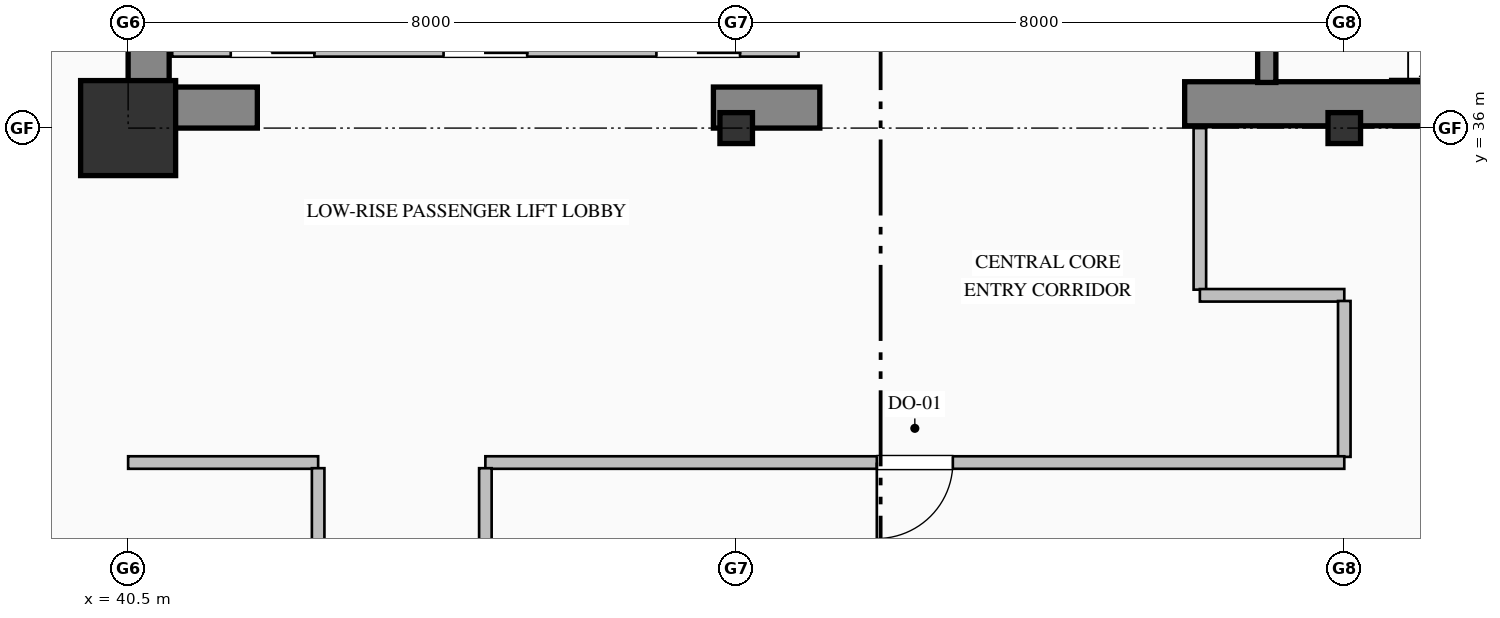
"""IFC4 building model, lengths in metres.
Left out: names, types, materials, properties, quantities, classifications, styles, units other than length and angle.
Written with IfcOpenShell. Run it as: python <this file> out.ifc"""

import sys

from ifc_helpers import new_model, si_unit, direction, frame, frame_2d, origin, origin_2d, place, context, subcontext, project, spatial, rectangle, hollow_rectangle, i_section, extrude, element, fill, save


model = new_model("IFC4")
c1 = context("Model", 3, precision=1e-05, world=origin(), true_north=direction((0.0, 1.0)))
c2 = subcontext(c1, "Body", "Model", "MODEL_VIEW")
j1 = project(units=[si_unit("LENGTHUNIT", "METRE"), si_unit("PLANEANGLEUNIT", "RADIAN")], contexts=[c1])
p1 = place(None, origin())
s1 = spatial("IfcSite", under=j1, at=p1, CompositionType="ELEMENT")
p2 = place(p1, origin())
s2 = spatial("IfcBuilding", under=s1, at=p2, CompositionType="ELEMENT")
p3 = place(p2, frame((0.0, 0.0, 92.2)))
s3 = spatial("IfcBuildingStorey", under=s2, at=p3, CompositionType="ELEMENT", Elevation=92.2)
p4 = place(p3, frame((40.77, 36.54, 0.0), z_axis=(0.0, 0.0, 1.0), x_axis=(0.0, 1.0, 0.0)))
e1 = element("IfcWall", 1, at=p4, inside=s3, PredefinedType="SHEAR", context=c2, shape_type="SweptSolid", body=[
    extrude(rectangle(XDim=7.86, YDim=0.54, at=frame_2d((3.93, 0.0))), origin(), (0.0, 0.0, 1.0), 3.75),
])
p5 = place(p3, frame((40.5, 36.27, 0.0), z_axis=(0.0, 0.0, 1.0), x_axis=(1.0, 0.0, 0.0)))
e2 = element("IfcWall", 2, at=p5, inside=s3, PredefinedType="SHEAR", context=c2, shape_type="SweptSolid", body=[
    extrude(rectangle(XDim=1.7, YDim=0.54, at=frame_2d((0.85, 0.0))), origin(), (0.0, 0.0, 1.0), 3.75),
])
p6 = place(p3, frame((48.2, 36.27, 0.0), z_axis=(0.0, 0.0, 1.0), x_axis=(1.0, 0.0, 0.0)))
e3 = element("IfcWall", 3, at=p6, inside=s3, PredefinedType="SHEAR", context=c2, shape_type="SweptSolid", body=[
    extrude(rectangle(XDim=1.4, YDim=0.54, at=frame_2d((0.7, 0.0))), origin(), (0.0, 0.0, 1.0), 3.75),
])
p7 = place(p3, frame((54.4, 36.32, 0.0), z_axis=(0.0, 0.0, 1.0), x_axis=(1.0, 0.0, 0.0)))
e4 = element("IfcWall", 4, at=p7, inside=s3, PredefinedType="SHEAR", context=c2, shape_type="SweptSolid", body=[
    extrude(rectangle(XDim=9.6, YDim=0.58, at=frame_2d((4.8, 0.0))), origin(), (0.0, 0.0, 1.0), 4.0),
])
p8 = place(p3, frame((40.5, 36.0, 0.0), z_axis=(0.0, 0.0, 1.0), x_axis=(1.0, 0.0, 0.0)))
e5 = element("IfcColumn", 5, at=p8, inside=s3, PredefinedType="COLUMN", context=c2, shape_type="SweptSolid", body=[
    extrude(hollow_rectangle(XDim=1.25, YDim=1.25, WallThickness=0.045, at=origin_2d()), origin(), (0.0, 0.0, 1.0), 4.0),
])
for number, where, z_axis, x_axis in (
    (6, (48.5, 36.0, 0.0), (0.0, 0.0, 1.0), (1.0, 0.0, 0.0)),
    (7, (56.5, 36.0, 0.0), (0.0, 0.0, 1.0), (1.0, 0.0, 0.0)),
):
    element("IfcColumn", number, at=place(p3, frame(where, z_axis=z_axis, x_axis=x_axis)), inside=s3, PredefinedType="COLUMN", context=c2, shape_type="SweptSolid", body=[
        extrude(i_section(OverallWidth=0.407, OverallDepth=0.428, WebThickness=0.02, FlangeThickness=0.035, FilletRadius=0.022, at=origin_2d()), origin(), (0.0, 0.0, 1.0), 4.0),
    ])
p9 = place(p3, frame((55.48, 39.75, 0.0), z_axis=(0.0, 0.0, 1.0), x_axis=(0.0, -1.0, 0.0)))
e8 = element("IfcWall", 8, at=p9, inside=s3, PredefinedType="SOLIDWALL", context=c2, shape_type="SweptSolid", body=[
    extrude(rectangle(XDim=3.15, YDim=0.24, at=frame_2d((1.575, 0.0))), origin(), (0.0, 0.0, 1.0), 4.0),
])
p10 = place(p9, frame((1.0, 0.0, 0.0)))
e9 = element("IfcOpeningElement", 9, at=p10, cuts=e8, PredefinedType="OPENING", context=c2, shape_type="SweptSolid", body=[
    extrude(rectangle(XDim=1.15, YDim=2.2, at=frame_2d((0.575, 1.1))), frame((0.0, 0.13, 0.0), z_axis=(0.0, -1.0, 0.0), x_axis=(1.0, 0.0, 0.0)), (0.0, 0.0, 1.0), 0.26),
])
p11 = place(p3, frame((49.32, 37.05, 0.0), z_axis=(0.0, 0.0, 1.0), x_axis=(-1.0, 0.0, 0.0)))
e10 = element("IfcWall", 10, at=p11, inside=s3, PredefinedType="PARTITIONING", context=c2, shape_type="SweptSolid", body=[
    extrude(rectangle(XDim=8.24, YDim=0.22, at=frame_2d((4.12, 0.0))), origin(), (0.0, 0.0, 1.0), 3.75),
])
p12 = place(p11, frame((6.37, 0.0, 0.0)))
e11 = element("IfcOpeningElement", 11, at=p12, cuts=e10, PredefinedType="OPENING", context=c2, shape_type="SweptSolid", body=[
    extrude(rectangle(XDim=1.1, YDim=2.2, at=frame_2d((0.55, 1.1))), frame((0.0, 0.12, 0.0), z_axis=(0.0, -1.0, 0.0), x_axis=(1.0, 0.0, 0.0)), (0.0, 0.0, 1.0), 0.24),
])
p13 = place(p11, frame((3.57, 0.0, 0.0)))
e12 = element("IfcOpeningElement", 12, at=p13, cuts=e10, PredefinedType="OPENING", context=c2, shape_type="SweptSolid", body=[
    extrude(rectangle(XDim=1.1, YDim=2.2, at=frame_2d((0.55, 1.1))), frame((0.0, 0.12, 0.0), z_axis=(0.0, -1.0, 0.0), x_axis=(1.0, 0.0, 0.0)), (0.0, 0.0, 1.0), 0.24),
])
p14 = place(p11, frame((0.77, 0.0, 0.0)))
e13 = element("IfcOpeningElement", 13, at=p14, cuts=e10, PredefinedType="OPENING", context=c2, shape_type="SweptSolid", body=[
    extrude(rectangle(XDim=1.1, YDim=2.2, at=frame_2d((0.55, 1.1))), frame((0.0, 0.12, 0.0), z_axis=(0.0, -1.0, 0.0), x_axis=(1.0, 0.0, 0.0)), (0.0, 0.0, 1.0), 0.24),
])
p15 = place(p3, frame((54.6, 36.0, 0.0), z_axis=(0.0, 0.0, 1.0), x_axis=(0.0, -1.0, 0.0)))
e14 = element("IfcWall", 14, at=p15, inside=s3, PredefinedType="PARTITIONING", context=c2, shape_type="SweptSolid", body=[
    extrude(rectangle(XDim=2.125, YDim=0.165, at=frame_2d((1.063, 0.0))), origin(), (0.0, 0.0, 1.0), 3.75),
])
p16 = place(p3, frame((54.6, 33.8, 0.0), z_axis=(0.0, 0.0, 1.0), x_axis=(1.0, 0.0, 0.0)))
e15 = element("IfcWall", 15, at=p16, inside=s3, PredefinedType="PARTITIONING", context=c2, shape_type="SweptSolid", body=[
    extrude(rectangle(XDim=1.9, YDim=0.165, at=frame_2d((0.95, 0.0))), origin(), (0.0, 0.0, 1.0), 3.75),
])
p17 = place(p3, frame((56.5, 33.726, 0.0), z_axis=(0.0, 0.0, 1.0), x_axis=(0.0, -1.0, 0.0)))
e16 = element("IfcWall", 16, at=p17, inside=s3, PredefinedType="PARTITIONING", context=c2, shape_type="SweptSolid", body=[
    extrude(rectangle(XDim=2.051, YDim=0.165, at=frame_2d((1.025, 0.0))), origin(), (0.0, 0.0, 1.0), 3.042),
])
p18 = place(p3, frame((56.5, 31.6, 0.0), z_axis=(0.0, 0.0, 1.0), x_axis=(-1.0, 0.0, 0.0)))
e17 = element("IfcWall", 17, at=p18, inside=s3, PredefinedType="PARTITIONING", context=c2, shape_type="SweptSolid", body=[
    extrude(rectangle(XDim=11.3, YDim=0.165, at=frame_2d((5.65, 0.0))), origin(), (0.0, 0.0, 1.0), 3.75),
])
p19 = place(p18, frame((5.15, 0.0, 0.0)))
e18 = element("IfcOpeningElement", 18, at=p19, cuts=e17, PredefinedType="OPENING", context=c2, shape_type="SweptSolid", body=[
    extrude(rectangle(XDim=1.0, YDim=2.15, at=frame_2d((0.5, 1.075))), frame((0.0, 0.093, 0.0), z_axis=(0.0, -1.0, 0.0), x_axis=(1.0, 0.0, 0.0)), (0.0, 0.0, 1.0), 0.185),
])
p20 = place(p3, frame((43.0, 31.6, 0.0), z_axis=(0.0, 0.0, 1.0), x_axis=(-1.0, 0.0, 0.0)))
e19 = element("IfcWall", 19, at=p20, inside=s3, PredefinedType="PARTITIONING", context=c2, shape_type="SweptSolid", body=[
    extrude(rectangle(XDim=2.5, YDim=0.165, at=frame_2d((1.25, 0.0))), origin(), (0.0, 0.0, 1.0), 3.75),
])
p21 = place(p3, frame((45.2, 31.525, 0.0), z_axis=(0.0, 0.0, 1.0), x_axis=(0.0, -1.0, 0.0)))
e20 = element("IfcWall", 20, at=p21, inside=s3, PredefinedType="PARTITIONING", context=c2, shape_type="SweptSolid", body=[
    extrude(rectangle(XDim=7.171, YDim=0.165, at=frame_2d((3.585, 0.0))), origin(), (0.0, 0.0, 1.0), 3.75),
])
p22 = place(p3, frame((43.0, 20.057, 0.0), z_axis=(0.0, 0.0, 1.0), x_axis=(0.0, 1.0, 0.0)))
e21 = element("IfcWall", 21, at=p22, inside=s3, PredefinedType="PARTITIONING", context=c2, shape_type="SweptSolid", body=[
    extrude(rectangle(XDim=11.469, YDim=0.165, at=frame_2d((5.734, 0.0))), origin(), (0.0, 0.0, 1.0), 3.75),
])
p23 = place(p22, frame((5.234, 0.0, 0.0)))
e22 = element("IfcOpeningElement", 22, at=p23, cuts=e21, PredefinedType="OPENING", context=c2, shape_type="SweptSolid", body=[
    extrude(rectangle(XDim=1.0, YDim=2.15, at=frame_2d((0.5, 1.075))), frame((0.0, 0.093, 0.0), z_axis=(0.0, -1.0, 0.0), x_axis=(1.0, 0.0, 0.0)), (0.0, 0.0, 1.0), 0.185),
])
p24 = place(p19, origin())
e23 = element("IfcDoor", 23, at=p24, inside=s3, OperationType="SINGLE_SWING_RIGHT", PredefinedType="DOOR", context=c2, shape_type="SweptSolid", body=[
    extrude(rectangle(XDim=1.0, YDim=2.15, at=frame_2d((0.5, 1.075))), frame((0.0, 0.025, 0.0), z_axis=(0.0, -1.0, 0.0), x_axis=(1.0, 0.0, 0.0)), (0.0, 0.0, 1.0), 0.05),
])
fill(e18, e23)
save(model, sys.argv[1])
